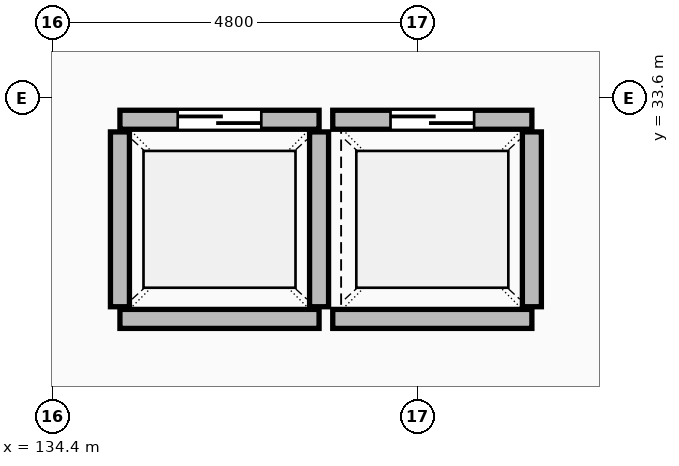
"""IFC4 building model, lengths in metres.
Left out: names, types, materials, properties, quantities, classifications, styles, units other than length and angle.
Written with IfcOpenShell. Run it as: python <this file> out.ifc"""

import sys

from ifc_helpers import new_model, si_unit, direction, frame, frame_2d, origin, place, context, subcontext, project, spatial, rectangle, extrude, element, fill, save


model = new_model("IFC4")
c1 = context("Model", 3, precision=1e-05, world=origin(), true_north=direction((0.0, 1.0)))
c2 = subcontext(c1, "Body", "Model", "MODEL_VIEW")
j1 = project(units=[si_unit("LENGTHUNIT", "METRE"), si_unit("PLANEANGLEUNIT", "RADIAN")], contexts=[c1])
p1 = place(None, origin())
s1 = spatial("IfcSite", under=j1, at=p1, CompositionType="ELEMENT")
p2 = place(p1, origin())
s2 = spatial("IfcBuilding", under=s1, at=p2, CompositionType="ELEMENT")
p3 = place(p2, origin())
s3 = spatial("IfcBuildingStorey", under=s2, at=p3, CompositionType="ELEMENT", Elevation=0.0)
p4 = place(p3, frame((135.29, 30.69, 0.0), z_axis=(0.0, 0.0, 1.0), x_axis=(1.0, 0.0, 0.0)))
e1 = element("IfcWall", 1, at=p4, inside=s3, PredefinedType="SOLIDWALL", context=c2, shape_type="SweptSolid", body=[
    extrude(rectangle(XDim=2.62, YDim=0.25, at=frame_2d((1.31, 0.0))), origin(), (0.0, 0.0, 1.0), 5.7),
])
p5 = place(p3, frame((135.29, 33.31, 0.0), z_axis=(0.0, 0.0, 1.0), x_axis=(1.0, 0.0, 0.0)))
e2 = element("IfcWall", 2, at=p5, inside=s3, PredefinedType="SOLIDWALL", context=c2, shape_type="SweptSolid", body=[
    extrude(rectangle(XDim=2.62, YDim=0.25, at=frame_2d((1.31, 0.0))), origin(), (0.0, 0.0, 1.0), 5.7),
])
p6 = place(p5, frame((0.76, 0.0, 0.0)))
e3 = element("IfcOpeningElement", 3, at=p6, cuts=e2, PredefinedType="OPENING", context=c2, shape_type="SweptSolid", body=[
    extrude(rectangle(XDim=1.1, YDim=2.2, at=frame_2d((0.55, 1.1))), frame((0.0, 0.137, 0.0), z_axis=(0.0, -1.0, 0.0), x_axis=(1.0, 0.0, 0.0)), (0.0, 0.0, 1.0), 0.274),
])
for number, where, z_axis, x_axis in (
    (4, (135.29, 30.85, 0.0), (0.0, 0.0, 1.0), (0.0, 1.0, 0.0)),
    (5, (137.91, 30.85, 0.0), (0.0, 0.0, 1.0), (0.0, 1.0, 0.0)),
):
    element("IfcWall", number, at=place(p3, frame(where, z_axis=z_axis, x_axis=x_axis)), inside=s3, PredefinedType="SOLIDWALL", context=c2, shape_type="SweptSolid", body=[
        extrude(rectangle(XDim=2.3, YDim=0.25, at=frame_2d((1.15, 0.0))), origin(), (0.0, 0.0, 1.0), 5.7),
    ])
p7 = place(p3, frame((138.09, 30.69, 0.0), z_axis=(0.0, 0.0, 1.0), x_axis=(1.0, 0.0, 0.0)))
e6 = element("IfcWall", 6, at=p7, inside=s3, PredefinedType="SOLIDWALL", context=c2, shape_type="SweptSolid", body=[
    extrude(rectangle(XDim=2.62, YDim=0.25, at=frame_2d((1.31, 0.0))), origin(), (0.0, 0.0, 1.0), 5.7),
])
p8 = place(p3, frame((138.09, 33.31, 0.0), z_axis=(0.0, 0.0, 1.0), x_axis=(1.0, 0.0, 0.0)))
e7 = element("IfcWall", 7, at=p8, inside=s3, PredefinedType="SOLIDWALL", context=c2, shape_type="SweptSolid", body=[
    extrude(rectangle(XDim=2.62, YDim=0.25, at=frame_2d((1.31, 0.0))), origin(), (0.0, 0.0, 1.0), 5.7),
])
p9 = place(p8, frame((0.76, 0.0, 0.0)))
e8 = element("IfcOpeningElement", 8, at=p9, cuts=e7, PredefinedType="OPENING", context=c2, shape_type="SweptSolid", body=[
    extrude(rectangle(XDim=1.1, YDim=2.2, at=frame_2d((0.55, 1.1))), frame((0.0, 0.137, 0.0), z_axis=(0.0, -1.0, 0.0), x_axis=(1.0, 0.0, 0.0)), (0.0, 0.0, 1.0), 0.274),
])
p10 = place(p3, frame((140.71, 30.85, 0.0), z_axis=(0.0, 0.0, 1.0), x_axis=(0.0, 1.0, 0.0)))
e9 = element("IfcWall", 9, at=p10, inside=s3, PredefinedType="SOLIDWALL", context=c2, shape_type="SweptSolid", body=[
    extrude(rectangle(XDim=2.3, YDim=0.25, at=frame_2d((1.15, 0.0))), origin(), (0.0, 0.0, 1.0), 5.7),
])
p11 = place(p6, origin())
e10 = element("IfcDoor", 10, at=p11, inside=s3, OperationType="SLIDING_TO_LEFT", PredefinedType="DOOR", context=c2, shape_type="SweptSolid", body=[
    extrude(rectangle(XDim=1.1, YDim=2.2, at=frame_2d((0.55, 1.1))), frame((0.0, 0.025, 0.0), z_axis=(0.0, -1.0, 0.0), x_axis=(1.0, 0.0, 0.0)), (0.0, 0.0, 1.0), 0.05),
])
fill(e3, e10)
p12 = place(p9, origin())
e11 = element("IfcDoor", 11, at=p12, inside=s3, OperationType="SLIDING_TO_LEFT", PredefinedType="DOOR", context=c2, shape_type="SweptSolid", body=[
    extrude(rectangle(XDim=1.1, YDim=2.2, at=frame_2d((0.55, 1.1))), frame((0.0, 0.025, 0.0), z_axis=(0.0, -1.0, 0.0), x_axis=(1.0, 0.0, 0.0)), (0.0, 0.0, 1.0), 0.05),
])
fill(e8, e11)
save(model, sys.argv[1])
